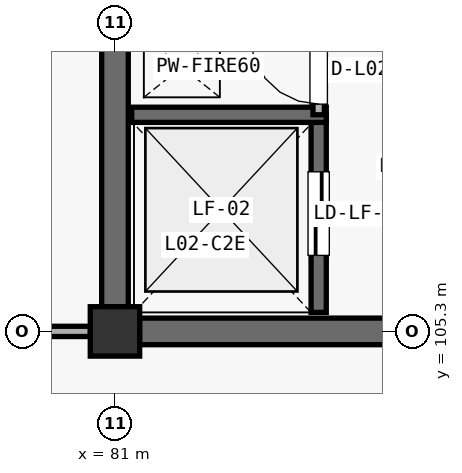
"""IFC4 building model, lengths in metres.
Left out: names, types, materials, properties, quantities, classifications, styles, units other than length and angle.
Written with IfcOpenShell. Run it as: python <this file> out.ifc"""

import sys

from ifc_helpers import new_model, si_unit, direction, frame, frame_2d, origin, origin_2d, place, context, subcontext, project, spatial, rectangle, extrude, element, fill, save


model = new_model("IFC4")
c1 = context("Model", 3, precision=1e-05, world=origin(), true_north=direction((0.0, 1.0)))
c2 = subcontext(c1, "Body", "Model", "MODEL_VIEW")
j1 = project(units=[si_unit("LENGTHUNIT", "METRE"), si_unit("PLANEANGLEUNIT", "RADIAN")], contexts=[c1])
p1 = place(None, origin())
s1 = spatial("IfcSite", under=j1, at=p1, CompositionType="ELEMENT")
p2 = place(p1, origin())
s2 = spatial("IfcBuilding", under=s1, at=p2, CompositionType="ELEMENT")
p3 = place(p2, frame((0.0, 0.0, 9.69)))
s3 = spatial("IfcBuildingStorey", under=s2, at=p3, CompositionType="ELEMENT", Elevation=9.69)
p4 = place(p3, frame((81.0, 105.3, 0.0), z_axis=(0.0, 0.0, 1.0), x_axis=(1.0, 0.0, 0.0)))
e1 = element("IfcColumn", 1, at=p4, inside=s3, PredefinedType="COLUMN", context=c2, shape_type="SweptSolid", body=[
    extrude(rectangle(XDim=0.65, YDim=0.65, at=origin_2d()), origin(), (0.0, 0.0, 1.0), 4.42),
])
p5 = place(p3, frame((81.0, 105.623, 0.0), z_axis=(0.0, 0.0, 1.0), x_axis=(0.0, 1.0, 0.0)))
e2 = element("IfcWall", 2, at=p5, inside=s3, PredefinedType="SHEAR", context=c2, shape_type="SweptSolid", body=[
    extrude(rectangle(XDim=7.454, YDim=0.35, at=frame_2d((3.727, 0.0))), origin(), (0.0, 0.0, 1.0), 4.142),
])
p6 = place(p3, frame((81.323, 105.3, 0.0), z_axis=(0.0, 0.0, 1.0), x_axis=(1.0, 0.0, 0.0)))
e3 = element("IfcWall", 3, at=p6, inside=s3, PredefinedType="SHEAR", context=c2, shape_type="SweptSolid", body=[
    extrude(rectangle(XDim=7.454, YDim=0.35, at=frame_2d((3.727, 0.0))), origin(), (0.0, 0.0, 1.0), 4.142),
])
p7 = place(p6, frame((5.204, 0.0, 0.0)))
e4 = element("IfcOpeningElement", 4, at=p7, cuts=e3, PredefinedType="OPENING", context=c2, shape_type="SweptSolid", body=[
    extrude(rectangle(XDim=1.2, YDim=2.2, at=frame_2d((0.6, 1.1))), frame((0.0, 0.185, 0.0), z_axis=(0.0, -1.0, 0.0), x_axis=(1.0, 0.0, 0.0)), (0.0, 0.0, 1.0), 0.37),
])
p8 = place(p3, frame((83.68, 105.55, 0.0), z_axis=(0.0, 0.0, 1.0), x_axis=(0.0, 1.0, 0.0)))
e5 = element("IfcWall", 5, at=p8, inside=s3, PredefinedType="SHEAR", context=c2, shape_type="SweptSolid", body=[
    extrude(rectangle(XDim=2.6, YDim=0.2, at=frame_2d((1.3, 0.0))), origin(), (0.0, 0.0, 1.0), 4.142),
])
p9 = place(p8, frame((0.75, 0.0, 0.0)))
e6 = element("IfcOpeningElement", 6, at=p9, cuts=e5, PredefinedType="OPENING", context=c2, shape_type="SweptSolid", body=[
    extrude(rectangle(XDim=1.1, YDim=2.2, at=frame_2d((0.55, 1.1))), frame((0.0, 0.11, 0.0), z_axis=(0.0, -1.0, 0.0), x_axis=(1.0, 0.0, 0.0)), (0.0, 0.0, 1.0), 0.22),
])
p10 = place(p3, frame((81.22, 108.15, 0.0), z_axis=(0.0, 0.0, 1.0), x_axis=(1.0, 0.0, 0.0)))
e7 = element("IfcWall", 7, at=p10, inside=s3, PredefinedType="SHEAR", context=c2, shape_type="SweptSolid", body=[
    extrude(rectangle(XDim=2.56, YDim=0.2, at=frame_2d((1.28, 0.0))), origin(), (0.0, 0.0, 1.0), 4.142),
])
p11 = place(p3, frame((83.68, 108.15, 0.0), z_axis=(0.0, 0.0, 1.0), x_axis=(0.0, 1.0, 0.0)))
e8 = element("IfcWall", 8, at=p11, inside=s3, PredefinedType="PARTITIONING", context=c2, shape_type="SweptSolid", body=[
    extrude(rectangle(XDim=1.26, YDim=0.15, at=frame_2d((0.63, 0.0))), origin(), (0.0, 0.0, 1.0), 4.142),
])
p12 = place(p11, frame((0.14, 0.0, 0.0)))
e9 = element("IfcOpeningElement", 9, at=p12, cuts=e8, PredefinedType="OPENING", context=c2, shape_type="SweptSolid", body=[
    extrude(rectangle(XDim=0.9, YDim=2.15, at=frame_2d((0.45, 1.075))), frame((0.0, 0.085, 0.0), z_axis=(0.0, -1.0, 0.0), x_axis=(1.0, 0.0, 0.0)), (0.0, 0.0, 1.0), 0.17),
])
p13 = place(p3, frame((73.223, 105.3, 0.0), z_axis=(0.0, 0.0, 1.0), x_axis=(1.0, 0.0, 0.0)))
e10 = element("IfcWall", 10, at=p13, inside=s3, PredefinedType="PARTITIONING", context=c2, shape_type="SweptSolid", body=[
    extrude(rectangle(XDim=7.454, YDim=0.135, at=frame_2d((3.727, 0.0))), origin(), (0.0, 0.0, 1.0), 3.392),
])
p14 = place(p9, origin())
e11 = element("IfcDoor", 11, at=p14, inside=s3, OperationType="SLIDING_TO_LEFT", PredefinedType="DOOR", context=c2, shape_type="SweptSolid", body=[
    extrude(rectangle(XDim=1.1, YDim=2.2, at=frame_2d((0.55, 1.1))), frame((0.0, 0.025, 0.0), z_axis=(0.0, -1.0, 0.0), x_axis=(1.0, 0.0, 0.0)), (0.0, 0.0, 1.0), 0.05),
])
fill(e6, e11)
p15 = place(p12, origin())
e12 = element("IfcDoor", 12, at=p15, inside=s3, OperationType="SINGLE_SWING_RIGHT", PredefinedType="DOOR", context=c2, shape_type="SweptSolid", body=[
    extrude(rectangle(XDim=0.9, YDim=2.15, at=frame_2d((0.45, 1.075))), frame((0.0, 0.025, 0.0), z_axis=(0.0, -1.0, 0.0), x_axis=(1.0, 0.0, 0.0)), (0.0, 0.0, 1.0), 0.05),
])
fill(e9, e12)
save(model, sys.argv[1])
